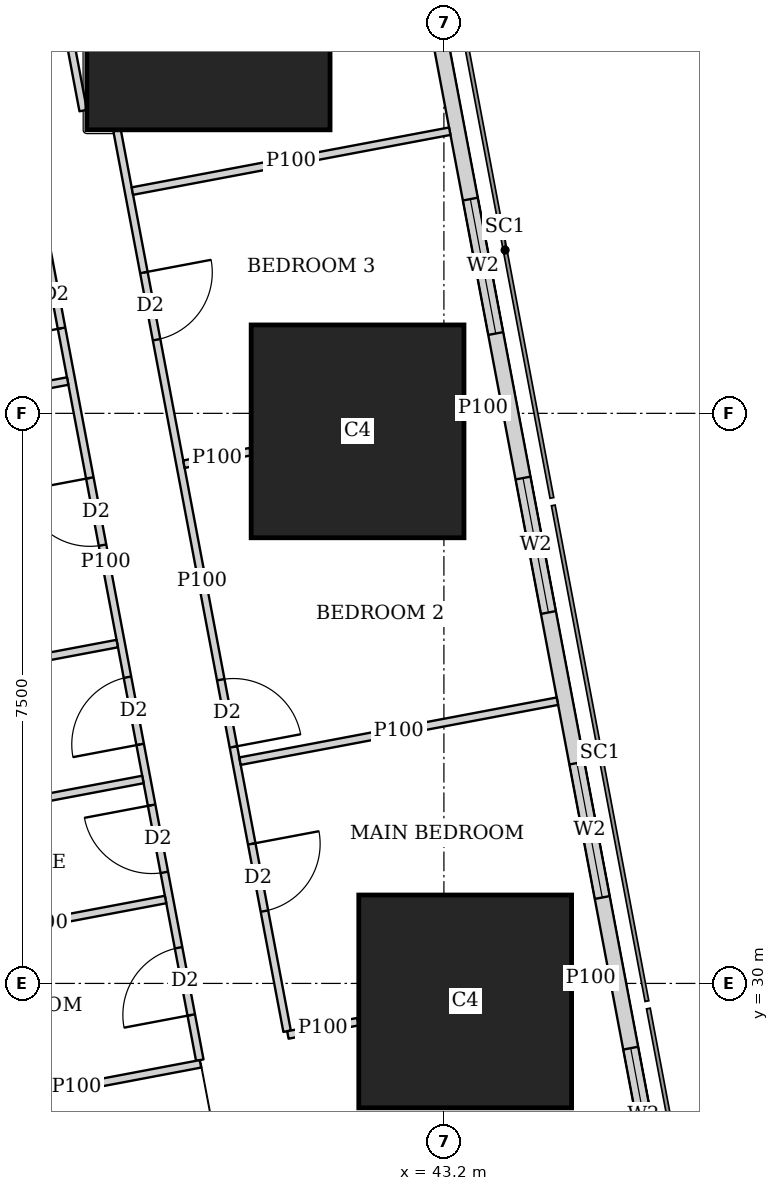
"""IFC4 building model, lengths in metres.
Left out: names, types, materials, properties, quantities, classifications, styles, units other than length and angle.
Written with IfcOpenShell. Run it as: python <this file> out.ifc"""

import sys

from ifc_helpers import new_model, si_unit, direction, frame, frame_2d, origin, origin_2d, place, context, subcontext, project, spatial, rectangle, extrude, element, fill, save


model = new_model("IFC4")
c1 = context("Model", 3, precision=1e-05, world=origin(), true_north=direction((0.0, 1.0)))
c2 = subcontext(c1, "Body", "Model", "MODEL_VIEW")
j1 = project(units=[si_unit("LENGTHUNIT", "METRE"), si_unit("PLANEANGLEUNIT", "RADIAN")], contexts=[c1])
p1 = place(None, origin())
s1 = spatial("IfcSite", under=j1, at=p1, CompositionType="ELEMENT")
p2 = place(p1, origin())
s2 = spatial("IfcBuilding", under=s1, at=p2, CompositionType="ELEMENT")
p3 = place(p2, frame((0.0, 0.0, 53.75)))
s3 = spatial("IfcBuildingStorey", under=s2, at=p3, CompositionType="ELEMENT", Elevation=53.75)
for number, where, z_axis, x_axis in (
    (1, (43.48, 29.763, 0.0), (0.0, 0.0, 1.0), (1.0, 0.0, 0.0)),
    (2, (42.064, 37.263, 0.0), (0.0, 0.0, 1.0), (1.0, 0.0, 0.0)),
):
    element("IfcColumn", number, at=place(p3, frame(where, z_axis=z_axis, x_axis=x_axis)), inside=s3, PredefinedType="COLUMN", context=c2, shape_type="SweptSolid", body=[
        extrude(rectangle(XDim=2.8, YDim=2.8, at=origin_2d()), origin(), (0.0, 0.0, 1.0), 3.75),
    ])
p4 = place(p3, frame((40.102, 42.83, 0.0), z_axis=(0.0, 0.0, 1.0), x_axis=(1.0, 0.0, 0.0)))
e3 = element("IfcColumn", 3, at=p4, inside=s3, PredefinedType="COLUMN", context=c2, shape_type="SweptSolid", body=[
    extrude(rectangle(XDim=3.2, YDim=3.2, at=origin_2d()), origin(), (0.0, 0.0, 1.0), 3.75),
])
p5 = place(p3, frame((50.653, 2.703, 0.0), z_axis=(0.0, 0.0, 1.0), x_axis=(-0.185612026696, 0.982623109613, 0.0)))
e4 = element("IfcWall", 4, at=p5, inside=s3, PredefinedType="SOLIDWALL", context=c2, shape_type="SweptSolid", body=[
    extrude(rectangle(XDim=41.393, YDim=0.2, at=frame_2d((20.697, 0.0))), origin(), (0.0, 0.0, 1.0), 3.5),
])
p6 = place(p5, frame((1.633, 0.0, 0.9)))
e5 = element("IfcOpeningElement", 5, at=p6, cuts=e4, PredefinedType="OPENING", context=c2, shape_type="SweptSolid", body=[
    extrude(rectangle(XDim=1.8, YDim=1.5, at=frame_2d((0.9, 0.75))), frame((0.0, 0.11, 0.0), z_axis=(0.0, -1.0, 0.0), x_axis=(1.0, 0.0, 0.0)), (0.0, 0.0, 1.0), 0.22),
])
p7 = place(p5, frame((6.032, 0.0, 0.9)))
e6 = element("IfcOpeningElement", 6, at=p7, cuts=e4, PredefinedType="OPENING", context=c2, shape_type="SweptSolid", body=[
    extrude(rectangle(XDim=1.8, YDim=1.5, at=frame_2d((0.9, 0.75))), frame((0.0, 0.11, 0.0), z_axis=(0.0, -1.0, 0.0), x_axis=(1.0, 0.0, 0.0)), (0.0, 0.0, 1.0), 0.22),
])
p8 = place(p5, frame((9.848, 0.0, 0.9)))
e7 = element("IfcOpeningElement", 7, at=p8, cuts=e4, PredefinedType="OPENING", context=c2, shape_type="SweptSolid", body=[
    extrude(rectangle(XDim=1.8, YDim=1.5, at=frame_2d((0.9, 0.75))), frame((0.0, 0.11, 0.0), z_axis=(0.0, -1.0, 0.0), x_axis=(1.0, 0.0, 0.0)), (0.0, 0.0, 1.0), 0.22),
])
p9 = place(p5, frame((17.481, 0.0, 0.9)))
e8 = element("IfcOpeningElement", 8, at=p9, cuts=e4, PredefinedType="OPENING", context=c2, shape_type="SweptSolid", body=[
    extrude(rectangle(XDim=1.8, YDim=1.5, at=frame_2d((0.9, 0.75))), frame((0.0, 0.11, 0.0), z_axis=(0.0, -1.0, 0.0), x_axis=(1.0, 0.0, 0.0)), (0.0, 0.0, 1.0), 0.22),
])
p10 = place(p5, frame((21.297, 0.0, 0.9)))
e9 = element("IfcOpeningElement", 9, at=p10, cuts=e4, PredefinedType="OPENING", context=c2, shape_type="SweptSolid", body=[
    extrude(rectangle(XDim=1.8, YDim=1.5, at=frame_2d((0.9, 0.75))), frame((0.0, 0.11, 0.0), z_axis=(0.0, -1.0, 0.0), x_axis=(1.0, 0.0, 0.0)), (0.0, 0.0, 1.0), 0.22),
])
p11 = place(p5, frame((25.113, 0.0, 0.9)))
e10 = element("IfcOpeningElement", 10, at=p11, cuts=e4, PredefinedType="OPENING", context=c2, shape_type="SweptSolid", body=[
    extrude(rectangle(XDim=1.8, YDim=1.5, at=frame_2d((0.9, 0.75))), frame((0.0, 0.11, 0.0), z_axis=(0.0, -1.0, 0.0), x_axis=(1.0, 0.0, 0.0)), (0.0, 0.0, 1.0), 0.22),
])
p12 = place(p5, frame((28.93, 0.0, 0.9)))
e11 = element("IfcOpeningElement", 11, at=p12, cuts=e4, PredefinedType="OPENING", context=c2, shape_type="SweptSolid", body=[
    extrude(rectangle(XDim=1.8, YDim=1.5, at=frame_2d((0.9, 0.75))), frame((0.0, 0.11, 0.0), z_axis=(0.0, -1.0, 0.0), x_axis=(1.0, 0.0, 0.0)), (0.0, 0.0, 1.0), 0.22),
])
p13 = place(p5, frame((32.746, 0.0, 0.9)))
e12 = element("IfcOpeningElement", 12, at=p13, cuts=e4, PredefinedType="OPENING", context=c2, shape_type="SweptSolid", body=[
    extrude(rectangle(XDim=1.8, YDim=1.5, at=frame_2d((0.9, 0.75))), frame((0.0, 0.11, 0.0), z_axis=(0.0, -1.0, 0.0), x_axis=(1.0, 0.0, 0.0)), (0.0, 0.0, 1.0), 0.22),
])
p14 = place(p5, frame((36.481, 0.0, 0.9)))
e13 = element("IfcOpeningElement", 13, at=p14, cuts=e4, PredefinedType="OPENING", context=c2, shape_type="SweptSolid", body=[
    extrude(rectangle(XDim=1.8, YDim=1.5, at=frame_2d((0.9, 0.75))), frame((0.0, 0.11, 0.0), z_axis=(0.0, -1.0, 0.0), x_axis=(1.0, 0.0, 0.0)), (0.0, 0.0, 1.0), 0.22),
])
p15 = place(p3, frame((35.094, 36.585, 0.0), z_axis=(0.0, 0.0, 1.0), x_axis=(0.185588860311, -0.982627485331, 0.0)))
e14 = element("IfcWall", 14, at=p15, inside=s3, PredefinedType="SOLIDWALL", context=c2, shape_type="SweptSolid", body=[
    extrude(rectangle(XDim=34.797, YDim=0.15, at=frame_2d((17.399, 0.0))), origin(), (0.0, 0.0, 1.0), 2.5),
])
p16 = place(p15, frame((9.828, 0.0, 0.0)))
e15 = element("IfcOpeningElement", 15, at=p16, cuts=e14, PredefinedType="OPENING", context=c2, shape_type="SweptSolid", body=[
    extrude(rectangle(XDim=1.0, YDim=2.1, at=frame_2d((0.5, 1.05))), frame((0.0, 0.085, 0.0), z_axis=(0.0, -1.0, 0.0), x_axis=(1.0, 0.0, 0.0)), (0.0, 0.0, 1.0), 0.17),
])
p17 = place(p15, frame((13.645, 0.0, 0.0)))
e16 = element("IfcOpeningElement", 16, at=p17, cuts=e14, PredefinedType="OPENING", context=c2, shape_type="SweptSolid", body=[
    extrude(rectangle(XDim=1.0, YDim=2.1, at=frame_2d((0.5, 1.05))), frame((0.0, 0.085, 0.0), z_axis=(0.0, -1.0, 0.0), x_axis=(1.0, 0.0, 0.0)), (0.0, 0.0, 1.0), 0.17),
])
p18 = place(p15, frame((25.9, 0.0, 0.0)))
e17 = element("IfcOpeningElement", 17, at=p18, cuts=e14, PredefinedType="OPENING", context=c2, shape_type="SweptSolid", body=[
    extrude(rectangle(XDim=1.0, YDim=2.1, at=frame_2d((0.5, 1.05))), frame((0.0, 0.085, 0.0), z_axis=(0.0, -1.0, 0.0), x_axis=(1.0, 0.0, 0.0)), (0.0, 0.0, 1.0), 0.17),
])
p19 = place(p3, frame((38.454, 41.483, 0.0), z_axis=(0.0, 0.0, 1.0), x_axis=(-0.185609245326, 0.982623634994, 0.0)))
e18 = element("IfcWall", 18, at=p19, inside=s3, PredefinedType="PARTITIONING", context=c2, shape_type="SweptSolid", body=[
    extrude(rectangle(XDim=4.241, YDim=0.1, at=frame_2d((2.12, 0.0))), origin(), (0.0, 0.0, 1.0), 2.05),
])
p20 = place(p3, frame((38.9, 41.22, 0.0), z_axis=(0.0, 0.0, 1.0), x_axis=(0.185521843026, -0.98264014052, 0.0)))
e19 = element("IfcWall", 19, at=p20, inside=s3, PredefinedType="PARTITIONING", context=c2, shape_type="SweptSolid", body=[
    extrude(rectangle(XDim=12.058, YDim=0.1, at=frame_2d((6.029, 0.0))), origin(), (0.0, 0.0, 1.0), 2.5),
])
p21 = place(p20, frame((9.55, 0.0, 0.0)))
e20 = element("IfcOpeningElement", 20, at=p21, cuts=e19, PredefinedType="OPENING", context=c2, shape_type="SweptSolid", body=[
    extrude(rectangle(XDim=0.9, YDim=2.1, at=frame_2d((0.45, 1.05))), frame((0.0, 0.06, 0.0), z_axis=(0.0, -1.0, 0.0), x_axis=(1.0, 0.0, 0.0)), (0.0, 0.0, 1.0), 0.12),
])
p22 = place(p20, frame((7.352, 0.0, 0.0)))
e21 = element("IfcOpeningElement", 21, at=p22, cuts=e19, PredefinedType="OPENING", context=c2, shape_type="SweptSolid", body=[
    extrude(rectangle(XDim=0.9, YDim=2.1, at=frame_2d((0.45, 1.05))), frame((0.0, 0.06, 0.0), z_axis=(0.0, -1.0, 0.0), x_axis=(1.0, 0.0, 0.0)), (0.0, 0.0, 1.0), 0.12),
])
p23 = place(p20, frame((1.9, 0.0, 0.0)))
e22 = element("IfcOpeningElement", 22, at=p23, cuts=e19, PredefinedType="OPENING", context=c2, shape_type="SweptSolid", body=[
    extrude(rectangle(XDim=0.9, YDim=2.1, at=frame_2d((0.45, 1.05))), frame((0.0, 0.06, 0.0), z_axis=(0.0, -1.0, 0.0), x_axis=(1.0, 0.0, 0.0)), (0.0, 0.0, 1.0), 0.12),
])
p24 = place(p3, frame((37.514, 42.089, 0.0), z_axis=(0.0, 0.0, 1.0), x_axis=(0.1856087397, -0.982623730503, 0.0)))
e23 = element("IfcWall", 23, at=p24, inside=s3, PredefinedType="PARTITIONING", context=c2, shape_type="SweptSolid", body=[
    extrude(rectangle(XDim=13.33, YDim=0.1, at=frame_2d((6.665, 0.0))), origin(), (0.0, 0.0, 1.0), 2.5),
])
p25 = place(p24, frame((11.825, 0.0, 0.0)))
e24 = element("IfcOpeningElement", 24, at=p25, cuts=e23, PredefinedType="OPENING", context=c2, shape_type="SweptSolid", body=[
    extrude(rectangle(XDim=0.9, YDim=2.1, at=frame_2d((0.45, 1.05))), frame((0.0, 0.06, 0.0), z_axis=(0.0, -1.0, 0.0), x_axis=(1.0, 0.0, 0.0)), (0.0, 0.0, 1.0), 0.12),
])
p26 = place(p24, frame((8.203, 0.0, 0.0)))
e25 = element("IfcOpeningElement", 25, at=p26, cuts=e23, PredefinedType="OPENING", context=c2, shape_type="SweptSolid", body=[
    extrude(rectangle(XDim=0.9, YDim=2.1, at=frame_2d((0.45, 1.05))), frame((0.0, 0.06, 0.0), z_axis=(0.0, -1.0, 0.0), x_axis=(1.0, 0.0, 0.0)), (0.0, 0.0, 1.0), 0.12),
])
p27 = place(p24, frame((2.63, 0.0, 0.0)))
e26 = element("IfcOpeningElement", 26, at=p27, cuts=e23, PredefinedType="OPENING", context=c2, shape_type="SweptSolid", body=[
    extrude(rectangle(XDim=0.9, YDim=2.1, at=frame_2d((0.45, 1.05))), frame((0.0, 0.06, 0.0), z_axis=(0.0, -1.0, 0.0), x_axis=(1.0, 0.0, 0.0)), (0.0, 0.0, 1.0), 0.12),
])
p28 = place(p24, frame((9.916, 0.0, 0.0)))
e27 = element("IfcOpeningElement", 27, at=p28, cuts=e23, PredefinedType="OPENING", context=c2, shape_type="SweptSolid", body=[
    extrude(rectangle(XDim=0.9, YDim=2.1, at=frame_2d((0.45, 1.05))), frame((0.0, 0.06, 0.0), z_axis=(0.0, -1.0, 0.0), x_axis=(1.0, 0.0, 0.0)), (0.0, 0.0, 1.0), 0.12),
])
p29 = place(p24, frame((5.535, 0.0, 0.0)))
e28 = element("IfcOpeningElement", 28, at=p29, cuts=e23, PredefinedType="OPENING", context=c2, shape_type="SweptSolid", body=[
    extrude(rectangle(XDim=0.9, YDim=2.1, at=frame_2d((0.45, 1.05))), frame((0.0, 0.06, 0.0), z_axis=(0.0, -1.0, 0.0), x_axis=(1.0, 0.0, 0.0)), (0.0, 0.0, 1.0), 0.12),
])
p30 = place(p3, frame((43.277, 41.212, 0.0), z_axis=(0.0, 0.0, 1.0), x_axis=(-0.982665405803, -0.185387972203, 0.0)))
e29 = element("IfcWall", 29, at=p30, inside=s3, PredefinedType="PARTITIONING", context=c2, shape_type="SweptSolid", body=[
    extrude(rectangle(XDim=4.25, YDim=0.1, at=frame_2d((2.125, 0.0))), origin(), (0.0, 0.0, 1.0), 2.05),
])
p31 = place(p3, frame((43.955, 37.62, 0.0), z_axis=(0.0, 0.0, 1.0), x_axis=(-0.982543152073, -0.186034820164, 0.0)))
e30 = element("IfcWall", 30, at=p31, inside=s3, PredefinedType="PARTITIONING", context=c2, shape_type="SweptSolid", body=[
    extrude(rectangle(XDim=0.49, YDim=0.1, at=frame_2d((0.245, 0.0))), origin(), (0.0, 0.0, 1.0), 3.5),
])
p32 = place(p3, frame((40.654, 36.996, 0.0), z_axis=(0.0, 0.0, 1.0), x_axis=(-0.982672962335, -0.185347913655, 0.0)))
e31 = element("IfcWall", 31, at=p32, inside=s3, PredefinedType="PARTITIONING", context=c2, shape_type="SweptSolid", body=[
    extrude(rectangle(XDim=0.89, YDim=0.1, at=frame_2d((0.445, 0.0))), origin(), (0.0, 0.0, 1.0), 3.5),
])
p33 = place(p3, frame((44.693, 33.713, 0.0), z_axis=(0.0, 0.0, 1.0), x_axis=(-0.982623519589, -0.185609856287, 0.0)))
e32 = element("IfcWall", 32, at=p33, inside=s3, PredefinedType="PARTITIONING", context=c2, shape_type="SweptSolid", body=[
    extrude(rectangle(XDim=4.25, YDim=0.1, at=frame_2d((2.125, 0.0))), origin(), (0.0, 0.0, 1.0), 2.05),
])
p34 = place(p3, frame((45.372, 30.121, 0.0), z_axis=(0.0, 0.0, 1.0), x_axis=(-0.982629142467, -0.185580086147, 0.0)))
e33 = element("IfcWall", 33, at=p34, inside=s3, PredefinedType="PARTITIONING", context=c2, shape_type="SweptSolid", body=[
    extrude(rectangle(XDim=0.491, YDim=0.1, at=frame_2d((0.245, 0.0))), origin(), (0.0, 0.0, 1.0), 3.5),
])
p35 = place(p3, frame((42.07, 29.497, 0.0), z_axis=(0.0, 0.0, 1.0), x_axis=(-0.982490624992, -0.186312028067, 0.0)))
e34 = element("IfcWall", 34, at=p35, inside=s3, PredefinedType="PARTITIONING", context=c2, shape_type="SweptSolid", body=[
    extrude(rectangle(XDim=0.939, YDim=0.1, at=frame_2d((0.47, 0.0))), origin(), (0.0, 0.0, 1.0), 2.5),
])
p36 = place(p3, frame((38.25, 37.925, 0.0), z_axis=(0.0, 0.0, 1.0), x_axis=(-0.982650574676, -0.185466568658, 0.0)))
e35 = element("IfcWall", 35, at=p36, inside=s3, PredefinedType="PARTITIONING", context=c2, shape_type="SweptSolid", body=[
    extrude(rectangle(XDim=1.364, YDim=0.1, at=frame_2d((0.682, 0.0))), origin(), (0.0, 0.0, 1.0), 3.5),
])
p37 = place(p3, frame((39.24, 32.683, 0.0), z_axis=(0.0, 0.0, 1.0), x_axis=(-0.982607026909, -0.185697147715, 0.0)))
e36 = element("IfcWall", 36, at=p37, inside=s3, PredefinedType="PARTITIONING", context=c2, shape_type="SweptSolid", body=[
    extrude(rectangle(XDim=3.275, YDim=0.1, at=frame_2d((1.637, 0.0))), origin(), (0.0, 0.0, 1.0), 3.5),
])
p38 = place(p3, frame((39.997, 28.942, 0.0), z_axis=(0.0, 0.0, 1.0), x_axis=(-0.982569883123, -0.185893584556, 0.0)))
e37 = element("IfcWall", 37, at=p38, inside=s3, PredefinedType="PARTITIONING", context=c2, shape_type="SweptSolid", body=[
    extrude(rectangle(XDim=3.324, YDim=0.1, at=frame_2d((1.662, 0.0))), origin(), (0.0, 0.0, 1.0), 3.5),
])
p39 = place(p3, frame((39.538, 31.104, 0.0), z_axis=(0.0, 0.0, 1.0), x_axis=(-0.982620626894, -0.185625169636, 0.0)))
e38 = element("IfcWall", 38, at=p39, inside=s3, PredefinedType="PARTITIONING", context=c2, shape_type="SweptSolid", body=[
    extrude(rectangle(XDim=3.275, YDim=0.1, at=frame_2d((1.637, 0.0))), origin(), (0.0, 0.0, 1.0), 2.5),
])
p40 = place(p3, frame((38.902, 34.471, 0.0), z_axis=(0.0, 0.0, 1.0), x_axis=(-0.982674977865, -0.185337227447, 0.0)))
e39 = element("IfcWall", 39, at=p40, inside=s3, PredefinedType="PARTITIONING", context=c2, shape_type="SweptSolid", body=[
    extrude(rectangle(XDim=3.275, YDim=0.1, at=frame_2d((1.637, 0.0))), origin(), (0.0, 0.0, 1.0), 3.5),
])
p41 = place(p11, origin())
e40 = element("IfcWindow", 40, at=p41, inside=s3, PartitioningType="SINGLE_PANEL", PredefinedType="WINDOW", context=c2, shape_type="SweptSolid", body=[
    extrude(rectangle(XDim=1.8, YDim=1.5, at=frame_2d((0.9, 0.75))), frame((0.0, 0.03, 0.0), z_axis=(0.0, -1.0, 0.0), x_axis=(1.0, 0.0, 0.0)), (0.0, 0.0, 1.0), 0.06),
])
fill(e10, e40)
p42 = place(p12, origin())
e41 = element("IfcWindow", 41, at=p42, inside=s3, PartitioningType="SINGLE_PANEL", PredefinedType="WINDOW", context=c2, shape_type="SweptSolid", body=[
    extrude(rectangle(XDim=1.8, YDim=1.5, at=frame_2d((0.9, 0.75))), frame((0.0, 0.03, 0.0), z_axis=(0.0, -1.0, 0.0), x_axis=(1.0, 0.0, 0.0)), (0.0, 0.0, 1.0), 0.06),
])
fill(e11, e41)
p43 = place(p13, origin())
e42 = element("IfcWindow", 42, at=p43, inside=s3, PartitioningType="SINGLE_PANEL", PredefinedType="WINDOW", context=c2, shape_type="SweptSolid", body=[
    extrude(rectangle(XDim=1.8, YDim=1.5, at=frame_2d((0.9, 0.75))), frame((0.0, 0.03, 0.0), z_axis=(0.0, -1.0, 0.0), x_axis=(1.0, 0.0, 0.0)), (0.0, 0.0, 1.0), 0.06),
])
fill(e12, e42)
p44 = place(p14, origin())
e43 = element("IfcWindow", 43, at=p44, inside=s3, PartitioningType="SINGLE_PANEL", PredefinedType="WINDOW", context=c2, shape_type="SweptSolid", body=[
    extrude(rectangle(XDim=1.8, YDim=1.5, at=frame_2d((0.9, 0.75))), frame((0.0, 0.03, 0.0), z_axis=(0.0, -1.0, 0.0), x_axis=(1.0, 0.0, 0.0)), (0.0, 0.0, 1.0), 0.06),
])
fill(e13, e43)
p45 = place(p21, origin())
e44 = element("IfcDoor", 44, at=p45, inside=s3, OperationType="SINGLE_SWING_LEFT", PredefinedType="DOOR", context=c2, shape_type="SweptSolid", body=[
    extrude(rectangle(XDim=0.9, YDim=2.1, at=frame_2d((0.45, 1.05))), frame((0.0, 0.025, 0.0), z_axis=(0.0, -1.0, 0.0), x_axis=(1.0, 0.0, 0.0)), (0.0, 0.0, 1.0), 0.05),
])
fill(e20, e44)
p46 = place(p22, origin())
e45 = element("IfcDoor", 45, at=p46, inside=s3, OperationType="SINGLE_SWING_RIGHT", PredefinedType="DOOR", context=c2, shape_type="SweptSolid", body=[
    extrude(rectangle(XDim=0.9, YDim=2.1, at=frame_2d((0.45, 1.05))), frame((0.0, 0.025, 0.0), z_axis=(0.0, -1.0, 0.0), x_axis=(1.0, 0.0, 0.0)), (0.0, 0.0, 1.0), 0.05),
])
fill(e21, e45)
p47 = place(p23, origin())
e46 = element("IfcDoor", 46, at=p47, inside=s3, OperationType="SINGLE_SWING_LEFT", PredefinedType="DOOR", context=c2, shape_type="SweptSolid", body=[
    extrude(rectangle(XDim=0.9, YDim=2.1, at=frame_2d((0.45, 1.05))), frame((0.0, 0.025, 0.0), z_axis=(0.0, -1.0, 0.0), x_axis=(1.0, 0.0, 0.0)), (0.0, 0.0, 1.0), 0.05),
])
fill(e22, e46)
p48 = place(p25, origin())
e47 = element("IfcDoor", 47, at=p48, inside=s3, OperationType="SINGLE_SWING_LEFT", PredefinedType="DOOR", context=c2, shape_type="SweptSolid", body=[
    extrude(rectangle(XDim=0.9, YDim=2.1, at=frame_2d((0.45, 1.05))), frame((0.0, 0.025, 0.0), z_axis=(0.0, -1.0, 0.0), x_axis=(1.0, 0.0, 0.0)), (0.0, 0.0, 1.0), 0.05),
])
fill(e24, e47)
p49 = place(p26, origin())
e48 = element("IfcDoor", 48, at=p49, inside=s3, OperationType="SINGLE_SWING_LEFT", PredefinedType="DOOR", context=c2, shape_type="SweptSolid", body=[
    extrude(rectangle(XDim=0.9, YDim=2.1, at=frame_2d((0.45, 1.05))), frame((0.0, 0.025, 0.0), z_axis=(0.0, -1.0, 0.0), x_axis=(1.0, 0.0, 0.0)), (0.0, 0.0, 1.0), 0.05),
])
fill(e25, e48)
p50 = place(p27, origin())
e49 = element("IfcDoor", 49, at=p50, inside=s3, OperationType="SINGLE_SWING_LEFT", PredefinedType="DOOR", context=c2, shape_type="SweptSolid", body=[
    extrude(rectangle(XDim=0.9, YDim=2.1, at=frame_2d((0.45, 1.05))), frame((0.0, 0.025, 0.0), z_axis=(0.0, -1.0, 0.0), x_axis=(1.0, 0.0, 0.0)), (0.0, 0.0, 1.0), 0.05),
])
fill(e26, e49)
p51 = place(p28, origin())
e50 = element("IfcDoor", 50, at=p51, inside=s3, OperationType="SINGLE_SWING_RIGHT", PredefinedType="DOOR", context=c2, shape_type="SweptSolid", body=[
    extrude(rectangle(XDim=0.9, YDim=2.1, at=frame_2d((0.45, 1.05))), frame((0.0, 0.025, 0.0), z_axis=(0.0, -1.0, 0.0), x_axis=(1.0, 0.0, 0.0)), (0.0, 0.0, 1.0), 0.05),
])
fill(e27, e50)
p52 = place(p29, origin())
e51 = element("IfcDoor", 51, at=p52, inside=s3, OperationType="SINGLE_SWING_RIGHT", PredefinedType="DOOR", context=c2, shape_type="SweptSolid", body=[
    extrude(rectangle(XDim=0.9, YDim=2.1, at=frame_2d((0.45, 1.05))), frame((0.0, 0.025, 0.0), z_axis=(0.0, -1.0, 0.0), x_axis=(1.0, 0.0, 0.0)), (0.0, 0.0, 1.0), 0.05),
])
fill(e28, e51)
save(model, sys.argv[1])
